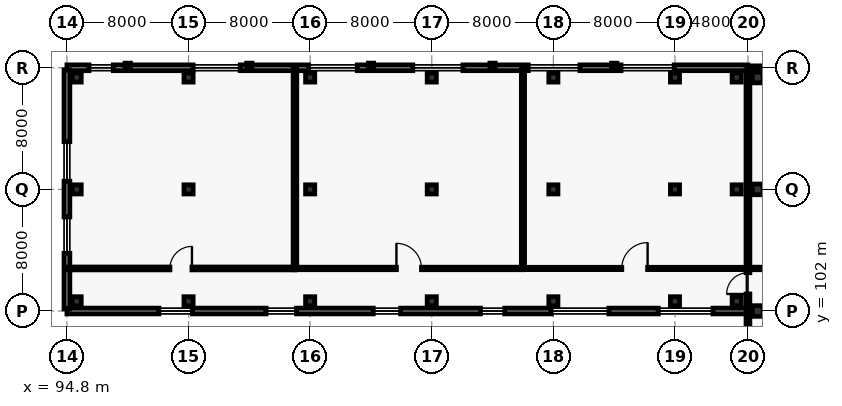
"""IFC4 building model, lengths in metres.
Left out: names, types, materials, properties, quantities, classifications, styles, units other than length and angle.
Written with IfcOpenShell. Run it as: python <this file> out.ifc"""

import sys

from ifc_helpers import new_model, si_unit, direction, frame, frame_2d, origin, origin_2d, place, context, subcontext, project, spatial, rectangle, extrude, element, fill, save


model = new_model("IFC4")
c1 = context("Model", 3, precision=1e-05, world=origin(), true_north=direction((0.0, 1.0)))
c2 = subcontext(c1, "Body", "Model", "MODEL_VIEW")
j1 = project(units=[si_unit("LENGTHUNIT", "METRE"), si_unit("PLANEANGLEUNIT", "RADIAN")], contexts=[c1])
p1 = place(None, origin())
s1 = spatial("IfcSite", under=j1, at=p1, CompositionType="ELEMENT")
p2 = place(p1, origin())
s2 = spatial("IfcBuilding", under=s1, at=p2, CompositionType="ELEMENT")
p3 = place(p2, frame((0.0, 0.0, 10.2)))
s3 = spatial("IfcBuildingStorey", under=s2, at=p3, CompositionType="ELEMENT", Elevation=10.2)
for number, where, z_axis, x_axis in (
    (1, (95.44, 102.64, 0.0), (0.0, 0.0, 1.0), (1.0, 0.0, 0.0)),
    (2, (95.44, 110.0, 0.0), (0.0, 0.0, 1.0), (1.0, 0.0, 0.0)),
    (3, (95.44, 117.36, 0.0), (0.0, 0.0, 1.0), (1.0, 0.0, 0.0)),
    (4, (102.8, 102.64, 0.0), (0.0, 0.0, 1.0), (1.0, 0.0, 0.0)),
    (5, (102.8, 110.0, 0.0), (0.0, 0.0, 1.0), (1.0, 0.0, 0.0)),
    (6, (102.8, 117.36, 0.0), (0.0, 0.0, 1.0), (1.0, 0.0, 0.0)),
    (7, (110.8, 102.64, 0.0), (0.0, 0.0, 1.0), (1.0, 0.0, 0.0)),
    (8, (110.8, 110.0, 0.0), (0.0, 0.0, 1.0), (1.0, 0.0, 0.0)),
    (9, (110.8, 117.36, 0.0), (0.0, 0.0, 1.0), (1.0, 0.0, 0.0)),
    (10, (118.8, 102.64, 0.0), (0.0, 0.0, 1.0), (1.0, 0.0, 0.0)),
    (11, (118.8, 110.0, 0.0), (0.0, 0.0, 1.0), (1.0, 0.0, 0.0)),
    (12, (118.8, 117.36, 0.0), (0.0, 0.0, 1.0), (1.0, 0.0, 0.0)),
    (13, (126.8, 102.64, 0.0), (0.0, 0.0, 1.0), (1.0, 0.0, 0.0)),
    (14, (126.8, 110.0, 0.0), (0.0, 0.0, 1.0), (1.0, 0.0, 0.0)),
    (15, (126.8, 117.36, 0.0), (0.0, 0.0, 1.0), (1.0, 0.0, 0.0)),
    (16, (134.8, 102.64, 0.0), (0.0, 0.0, 1.0), (1.0, 0.0, 0.0)),
    (17, (134.8, 110.0, 0.0), (0.0, 0.0, 1.0), (1.0, 0.0, 0.0)),
    (18, (134.8, 117.36, 0.0), (0.0, 0.0, 1.0), (1.0, 0.0, 0.0)),
    (19, (138.86, 102.64, 0.0), (0.0, 0.0, 1.0), (1.0, 0.0, 0.0)),
    (20, (138.86, 110.0, 0.0), (0.0, 0.0, 1.0), (1.0, 0.0, 0.0)),
    (21, (138.86, 117.36, 0.0), (0.0, 0.0, 1.0), (1.0, 0.0, 0.0)),
):
    element("IfcColumn", number, at=place(p3, frame(where, z_axis=z_axis, x_axis=x_axis)), inside=s3, PredefinedType="COLUMN", context=c2, shape_type="SweptSolid", body=[
        extrude(rectangle(XDim=0.6, YDim=0.6, at=origin_2d()), origin(), (0.0, 0.0, 1.0), 5.4),
    ])
for number, where, z_axis, x_axis in (
    (22, (140.24, 102.0, 0.0), (0.0, 0.0, 1.0), (1.0, 0.0, 0.0)),
    (23, (140.24, 110.0, 0.0), (0.0, 0.0, 1.0), (1.0, 0.0, 0.0)),
    (24, (140.24, 117.36, 0.0), (0.0, 0.0, 1.0), (1.0, 0.0, 0.0)),
):
    element("IfcColumn", number, at=place(p3, frame(where, z_axis=z_axis, x_axis=x_axis)), inside=s3, PredefinedType="COLUMN", context=c2, shape_type="SweptSolid", body=[
        extrude(rectangle(XDim=0.7, YDim=0.7, at=origin_2d()), origin(), (0.0, 0.0, 1.0), 5.4),
    ])
for number, where, z_axis, x_axis in (
    (25, (98.8, 118.08, 0.0), (0.0, 0.0, 1.0), (0.0, 1.0, 0.0)),
    (26, (106.8, 118.08, 0.0), (0.0, 0.0, 1.0), (0.0, 1.0, 0.0)),
    (27, (114.8, 118.08, 0.0), (0.0, 0.0, 1.0), (0.0, 1.0, 0.0)),
    (28, (122.8, 118.08, 0.0), (0.0, 0.0, 1.0), (0.0, 1.0, 0.0)),
    (29, (130.8, 118.08, 0.0), (0.0, 0.0, 1.0), (0.0, 1.0, 0.0)),
):
    element("IfcColumn", number, at=place(p3, frame(where, z_axis=z_axis, x_axis=x_axis)), inside=s3, PredefinedType="PILASTER", context=c2, shape_type="SweptSolid", body=[
        extrude(rectangle(XDim=0.35, YDim=0.45, at=origin_2d()), origin(), (0.0, 0.0, 1.0), 5.4),
    ])
p4 = place(p3, frame((94.8, 118.0, 0.0), z_axis=(0.0, 0.0, 1.0), x_axis=(1.0, 0.0, 0.0)))
e30 = element("IfcWall", 30, at=p4, inside=s3, PredefinedType="SOLIDWALL", context=c2, shape_type="SweptSolid", body=[
    extrude(rectangle(XDim=44.795, YDim=0.38, at=frame_2d((22.397, 0.0))), origin(), (0.0, 0.0, 1.0), 5.16),
])
p5 = place(p4, frame((1.45, 0.0, 0.9)))
e31 = element("IfcOpeningElement", 31, at=p5, cuts=e30, PredefinedType="OPENING", context=c2, shape_type="SweptSolid", body=[
    extrude(rectangle(XDim=1.6, YDim=1.65, at=frame_2d((0.8, 0.825))), frame((0.0, 0.2, 0.0), z_axis=(0.0, -1.0, 0.0), x_axis=(1.0, 0.0, 0.0)), (0.0, 0.0, 1.0), 0.4),
])
p6 = place(p4, frame((8.3, 0.0, 0.9)))
e32 = element("IfcOpeningElement", 32, at=p6, cuts=e30, PredefinedType="OPENING", context=c2, shape_type="SweptSolid", body=[
    extrude(rectangle(XDim=3.1, YDim=2.45, at=frame_2d((1.55, 1.225))), frame((0.0, 0.2, 0.0), z_axis=(0.0, -1.0, 0.0), x_axis=(1.0, 0.0, 0.0)), (0.0, 0.0, 1.0), 0.4),
])
p7 = place(p4, frame((15.9, 0.0, 0.9)))
e33 = element("IfcOpeningElement", 33, at=p7, cuts=e30, PredefinedType="OPENING", context=c2, shape_type="SweptSolid", body=[
    extrude(rectangle(XDim=3.2, YDim=2.5, at=frame_2d((1.6, 1.25))), frame((0.0, 0.2, 0.0), z_axis=(0.0, -1.0, 0.0), x_axis=(1.0, 0.0, 0.0)), (0.0, 0.0, 1.0), 0.4),
])
p8 = place(p4, frame((22.75, 0.0, 0.9)))
e34 = element("IfcOpeningElement", 34, at=p8, cuts=e30, PredefinedType="OPENING", context=c2, shape_type="SweptSolid", body=[
    extrude(rectangle(XDim=3.3, YDim=2.5, at=frame_2d((1.65, 1.25))), frame((0.0, 0.2, 0.0), z_axis=(0.0, -1.0, 0.0), x_axis=(1.0, 0.0, 0.0)), (0.0, 0.0, 1.0), 0.4),
])
p9 = place(p4, frame((30.35, 0.0, 0.9)))
e35 = element("IfcOpeningElement", 35, at=p9, cuts=e30, PredefinedType="OPENING", context=c2, shape_type="SweptSolid", body=[
    extrude(rectangle(XDim=3.4, YDim=2.55, at=frame_2d((1.7, 1.275))), frame((0.0, 0.2, 0.0), z_axis=(0.0, -1.0, 0.0), x_axis=(1.0, 0.0, 0.0)), (0.0, 0.0, 1.0), 0.4),
])
p10 = place(p4, frame((36.45, 0.0, 0.9)))
e36 = element("IfcOpeningElement", 36, at=p10, cuts=e30, PredefinedType="OPENING", context=c2, shape_type="SweptSolid", body=[
    extrude(rectangle(XDim=3.5, YDim=2.55, at=frame_2d((1.75, 1.275))), frame((0.0, 0.2, 0.0), z_axis=(0.0, -1.0, 0.0), x_axis=(1.0, 0.0, 0.0)), (0.0, 0.0, 1.0), 0.4),
])
p11 = place(p3, frame((139.5, 102.0, 0.0), z_axis=(0.0, 0.0, 1.0), x_axis=(-1.0, 0.0, 0.0)))
e37 = element("IfcWall", 37, at=p11, inside=s3, PredefinedType="SOLIDWALL", context=c2, shape_type="SweptSolid", body=[
    extrude(rectangle(XDim=44.7, YDim=0.38, at=frame_2d((22.35, 0.0))), origin(), (0.0, 0.0, 1.0), 5.16),
])
p12 = place(p11, frame((2.2, 0.0, 0.9)))
e38 = element("IfcOpeningElement", 38, at=p12, cuts=e37, PredefinedType="OPENING", context=c2, shape_type="SweptSolid", body=[
    extrude(rectangle(XDim=3.6, YDim=2.6, at=frame_2d((1.8, 1.3))), frame((0.0, 0.2, 0.0), z_axis=(0.0, -1.0, 0.0), x_axis=(1.0, 0.0, 0.0)), (0.0, 0.0, 1.0), 0.4),
])
p13 = place(p11, frame((9.05, 0.0, 0.9)))
e39 = element("IfcOpeningElement", 39, at=p13, cuts=e37, PredefinedType="OPENING", context=c2, shape_type="SweptSolid", body=[
    extrude(rectangle(XDim=3.8, YDim=2.6, at=frame_2d((1.9, 1.3))), frame((0.0, 0.2, 0.0), z_axis=(0.0, -1.0, 0.0), x_axis=(1.0, 0.0, 0.0)), (0.0, 0.0, 1.0), 0.4),
])
p14 = place(p11, frame((15.9, 0.0, 0.9)))
e40 = element("IfcOpeningElement", 40, at=p14, cuts=e37, PredefinedType="OPENING", context=c2, shape_type="SweptSolid", body=[
    extrude(rectangle(XDim=1.6, YDim=1.65, at=frame_2d((0.8, 0.825))), frame((0.0, 0.2, 0.0), z_axis=(0.0, -1.0, 0.0), x_axis=(1.0, 0.0, 0.0)), (0.0, 0.0, 1.0), 0.4),
])
p15 = place(p11, frame((22.75, 0.0, 0.9)))
e41 = element("IfcOpeningElement", 41, at=p15, cuts=e37, PredefinedType="OPENING", context=c2, shape_type="SweptSolid", body=[
    extrude(rectangle(XDim=1.8, YDim=1.65, at=frame_2d((0.9, 0.825))), frame((0.0, 0.2, 0.0), z_axis=(0.0, -1.0, 0.0), x_axis=(1.0, 0.0, 0.0)), (0.0, 0.0, 1.0), 0.4),
])
p16 = place(p11, frame((29.6, 0.0, 0.9)))
e42 = element("IfcOpeningElement", 42, at=p16, cuts=e37, PredefinedType="OPENING", context=c2, shape_type="SweptSolid", body=[
    extrude(rectangle(XDim=2.0, YDim=1.7, at=frame_2d((1.0, 0.85))), frame((0.0, 0.2, 0.0), z_axis=(0.0, -1.0, 0.0), x_axis=(1.0, 0.0, 0.0)), (0.0, 0.0, 1.0), 0.4),
])
p17 = place(p11, frame((36.45, 0.0, 0.9)))
e43 = element("IfcOpeningElement", 43, at=p17, cuts=e37, PredefinedType="OPENING", context=c2, shape_type="SweptSolid", body=[
    extrude(rectangle(XDim=2.2, YDim=1.7, at=frame_2d((1.1, 0.85))), frame((0.0, 0.2, 0.0), z_axis=(0.0, -1.0, 0.0), x_axis=(1.0, 0.0, 0.0)), (0.0, 0.0, 1.0), 0.4),
])
p18 = place(p3, frame((94.8, 102.14, 0.0), z_axis=(0.0, 0.0, 1.0), x_axis=(0.0, 1.0, 0.0)))
e44 = element("IfcWall", 44, at=p18, inside=s3, PredefinedType="SOLIDWALL", context=c2, shape_type="SweptSolid", body=[
    extrude(rectangle(XDim=15.72, YDim=0.38, at=frame_2d((7.86, 0.0))), origin(), (0.0, 0.0, 1.0), 5.16),
])
p19 = place(p18, frame((3.65, 0.0, 0.9)))
e45 = element("IfcOpeningElement", 45, at=p19, cuts=e44, PredefinedType="OPENING", context=c2, shape_type="SweptSolid", body=[
    extrude(rectangle(XDim=2.4, YDim=1.75, at=frame_2d((1.2, 0.875))), frame((0.0, 0.2, 0.0), z_axis=(0.0, -1.0, 0.0), x_axis=(1.0, 0.0, 0.0)), (0.0, 0.0, 1.0), 0.4),
])
p20 = place(p18, frame((8.4, 0.0, 0.9)))
e46 = element("IfcOpeningElement", 46, at=p20, cuts=e44, PredefinedType="OPENING", context=c2, shape_type="SweptSolid", body=[
    extrude(rectangle(XDim=2.6, YDim=1.75, at=frame_2d((1.3, 0.875))), frame((0.0, 0.2, 0.0), z_axis=(0.0, -1.0, 0.0), x_axis=(1.0, 0.0, 0.0)), (0.0, 0.0, 1.0), 0.4),
])
p21 = place(p3, frame((139.6, 118.0, 0.0), z_axis=(0.0, 0.0, 1.0), x_axis=(1.0, 0.0, 0.0)))
e47 = element("IfcWall", 47, at=p21, inside=s3, PredefinedType="SOLIDWALL", context=c2, shape_type="SweptSolid", body=[
    extrude(rectangle(XDim=32.4, YDim=0.25, at=frame_2d((16.2, 0.0))), origin(), (0.0, 0.0, 1.0), 5.16),
])
p22 = place(p21, frame((2.2, 0.0, 0.9)))
e48 = element("IfcOpeningElement", 48, at=p22, cuts=e47, PredefinedType="OPENING", context=c2, shape_type="SweptSolid", body=[
    extrude(rectangle(XDim=3.4, YDim=2.55, at=frame_2d((1.7, 1.275))), frame((0.0, 0.135, 0.0), z_axis=(0.0, -1.0, 0.0), x_axis=(1.0, 0.0, 0.0)), (0.0, 0.0, 1.0), 0.27),
])
p23 = place(p21, frame((7.96, 0.0, 0.9)))
e49 = element("IfcOpeningElement", 49, at=p23, cuts=e47, PredefinedType="OPENING", context=c2, shape_type="SweptSolid", body=[
    extrude(rectangle(XDim=3.5, YDim=2.55, at=frame_2d((1.75, 1.275))), frame((0.0, 0.135, 0.0), z_axis=(0.0, -1.0, 0.0), x_axis=(1.0, 0.0, 0.0)), (0.0, 0.0, 1.0), 0.27),
])
p24 = place(p21, frame((12.27, 0.0, 0.9)))
e50 = element("IfcOpeningElement", 50, at=p24, cuts=e47, PredefinedType="OPENING", context=c2, shape_type="SweptSolid", body=[
    extrude(rectangle(XDim=3.6, YDim=2.6, at=frame_2d((1.8, 1.3))), frame((0.0, 0.135, 0.0), z_axis=(0.0, -1.0, 0.0), x_axis=(1.0, 0.0, 0.0)), (0.0, 0.0, 1.0), 0.27),
])
p25 = place(p21, frame((19.48, 0.0, 0.9)))
e51 = element("IfcOpeningElement", 51, at=p25, cuts=e47, PredefinedType="OPENING", context=c2, shape_type="SweptSolid", body=[
    extrude(rectangle(XDim=1.6, YDim=1.65, at=frame_2d((0.8, 0.825))), frame((0.0, 0.135, 0.0), z_axis=(0.0, -1.0, 0.0), x_axis=(1.0, 0.0, 0.0)), (0.0, 0.0, 1.0), 0.27),
])
p26 = place(p3, frame((139.6, 71.74, 0.0), z_axis=(0.0, 0.0, 1.0), x_axis=(0.0, 1.0, 0.0)))
e52 = element("IfcWall", 52, at=p26, inside=s3, PredefinedType="SOLIDWALL", context=c2, shape_type="SweptSolid", body=[
    extrude(rectangle(XDim=46.12, YDim=0.25, at=frame_2d((23.06, 0.0))), origin(), (0.0, 0.0, 1.0), 4.31),
])
p27 = place(p26, frame((31.38, 0.0, 0.0)))
e53 = element("IfcOpeningElement", 53, at=p27, cuts=e52, PredefinedType="OPENING", context=c2, shape_type="SweptSolid", body=[
    extrude(rectangle(XDim=1.4, YDim=2.25, at=frame_2d((0.7, 1.125))), frame((0.0, 0.135, 0.0), z_axis=(0.0, -1.0, 0.0), x_axis=(1.0, 0.0, 0.0)), (0.0, 0.0, 1.0), 0.27),
])
p28 = place(p3, frame((94.8, 104.8, 0.0), z_axis=(0.0, 0.0, 1.0), x_axis=(1.0, 0.0, 0.0)))
e54 = element("IfcWall", 54, at=p28, inside=s3, PredefinedType="PARTITIONING", context=c2, shape_type="SweptSolid", body=[
    extrude(rectangle(XDim=15.0, YDim=0.19, at=frame_2d((7.5, 0.0))), origin(), (0.0, 0.0, 1.0), 5.16),
])
p29 = place(p28, frame((6.775, 0.0, 0.0)))
e55 = element("IfcOpeningElement", 55, at=p29, cuts=e54, PredefinedType="OPENING", context=c2, shape_type="SweptSolid", body=[
    extrude(rectangle(XDim=1.45, YDim=2.25, at=frame_2d((0.725, 1.125))), frame((0.0, 0.105, 0.0), z_axis=(0.0, -1.0, 0.0), x_axis=(1.0, 0.0, 0.0)), (0.0, 0.0, 1.0), 0.21),
])
p30 = place(p3, frame((109.8, 104.8, 0.0), z_axis=(0.0, 0.0, 1.0), x_axis=(1.0, 0.0, 0.0)))
e56 = element("IfcWall", 56, at=p30, inside=s3, PredefinedType="PARTITIONING", context=c2, shape_type="SweptSolid", body=[
    extrude(rectangle(XDim=15.0, YDim=0.165, at=frame_2d((7.5, 0.0))), origin(), (0.0, 0.0, 1.0), 5.16),
])
p31 = place(p30, frame((6.675, 0.0, 0.0)))
e57 = element("IfcOpeningElement", 57, at=p31, cuts=e56, PredefinedType="OPENING", context=c2, shape_type="SweptSolid", body=[
    extrude(rectangle(XDim=1.65, YDim=2.3, at=frame_2d((0.825, 1.15))), frame((0.0, 0.093, 0.0), z_axis=(0.0, -1.0, 0.0), x_axis=(1.0, 0.0, 0.0)), (0.0, 0.0, 1.0), 0.185),
])
p32 = place(p3, frame((124.8, 104.8, 0.0), z_axis=(0.0, 0.0, 1.0), x_axis=(1.0, 0.0, 0.0)))
e58 = element("IfcWall", 58, at=p32, inside=s3, PredefinedType="PARTITIONING", context=c2, shape_type="SweptSolid", body=[
    extrude(rectangle(XDim=14.7, YDim=0.15, at=frame_2d((7.35, 0.0))), origin(), (0.0, 0.0, 1.0), 5.16),
])
p33 = place(p32, frame((6.5, 0.0, 0.0)))
e59 = element("IfcOpeningElement", 59, at=p33, cuts=e58, PredefinedType="OPENING", context=c2, shape_type="SweptSolid", body=[
    extrude(rectangle(XDim=1.7, YDim=2.3, at=frame_2d((0.85, 1.15))), frame((0.0, 0.085, 0.0), z_axis=(0.0, -1.0, 0.0), x_axis=(1.0, 0.0, 0.0)), (0.0, 0.0, 1.0), 0.17),
])
p34 = place(p3, frame((109.8, 118.0, 0.0), z_axis=(0.0, 0.0, 1.0), x_axis=(0.0, -1.0, 0.0)))
e60 = element("IfcWall", 60, at=p34, inside=s3, PredefinedType="PARTITIONING", context=c2, shape_type="SweptSolid", body=[
    extrude(rectangle(XDim=13.2, YDim=0.24, at=frame_2d((6.6, 0.0))), origin(), (0.0, 0.0, 1.0), 5.16),
])
p35 = place(p3, frame((124.8, 118.0, 0.0), z_axis=(0.0, 0.0, 1.0), x_axis=(0.0, -1.0, 0.0)))
e61 = element("IfcWall", 61, at=p35, inside=s3, PredefinedType="PARTITIONING", context=c2, shape_type="SweptSolid", body=[
    extrude(rectangle(XDim=13.2, YDim=0.21, at=frame_2d((6.6, 0.0))), origin(), (0.0, 0.0, 1.0), 5.16),
])
p36 = place(p3, frame((157.4, 102.0, 0.0), z_axis=(0.0, 0.0, 1.0), x_axis=(-1.0, 0.0, 0.0)))
e62 = element("IfcWall", 62, at=p36, inside=s3, PredefinedType="PARTITIONING", context=c2, shape_type="SweptSolid", body=[
    extrude(rectangle(XDim=17.8, YDim=0.19, at=frame_2d((8.9, 0.0))), origin(), (0.0, 0.0, 1.0), 4.51),
])
p37 = place(p36, frame((8.38, 0.0, 0.0)))
e63 = element("IfcOpeningElement", 63, at=p37, cuts=e62, PredefinedType="OPENING", context=c2, shape_type="SweptSolid", body=[
    extrude(rectangle(XDim=1.04, YDim=2.2, at=frame_2d((0.52, 1.1))), frame((0.0, 0.105, 0.0), z_axis=(0.0, -1.0, 0.0), x_axis=(1.0, 0.0, 0.0)), (0.0, 0.0, 1.0), 0.21),
])
p38 = place(p3, frame((139.6, 104.8, 0.0), z_axis=(0.0, 0.0, 1.0), x_axis=(1.0, 0.0, 0.0)))
e64 = element("IfcWall", 64, at=p38, inside=s3, PredefinedType="PARTITIONING", context=c2, shape_type="SweptSolid", body=[
    extrude(rectangle(XDim=17.8, YDim=0.165, at=frame_2d((8.9, 0.0))), origin(), (0.0, 0.0, 1.0), 5.16),
])
p39 = place(p38, frame((8.41, 0.0, 0.0)))
e65 = element("IfcOpeningElement", 65, at=p39, cuts=e64, PredefinedType="OPENING", context=c2, shape_type="SweptSolid", body=[
    extrude(rectangle(XDim=0.98, YDim=2.1, at=frame_2d((0.49, 1.05))), frame((0.0, 0.093, 0.0), z_axis=(0.0, -1.0, 0.0), x_axis=(1.0, 0.0, 0.0)), (0.0, 0.0, 1.0), 0.185),
])
p40 = place(p38, frame((13.394, 0.0, 0.0)))
e66 = element("IfcOpeningElement", 66, at=p40, cuts=e64, PredefinedType="OPENING", context=c2, shape_type="SweptSolid", body=[
    extrude(rectangle(XDim=0.98, YDim=2.1, at=frame_2d((0.49, 1.05))), frame((0.0, 0.093, 0.0), z_axis=(0.0, -1.0, 0.0), x_axis=(1.0, 0.0, 0.0)), (0.0, 0.0, 1.0), 0.185),
])
p41 = place(p5, origin())
e67 = element("IfcWindow", 67, at=p41, inside=s3, PartitioningType="SINGLE_PANEL", PredefinedType="WINDOW", context=c2, shape_type="SweptSolid", body=[
    extrude(rectangle(XDim=1.6, YDim=1.65, at=frame_2d((0.8, 0.825))), frame((0.0, 0.03, 0.0), z_axis=(0.0, -1.0, 0.0), x_axis=(1.0, 0.0, 0.0)), (0.0, 0.0, 1.0), 0.06),
])
fill(e31, e67)
p42 = place(p6, origin())
e68 = element("IfcWindow", 68, at=p42, inside=s3, PartitioningType="SINGLE_PANEL", PredefinedType="WINDOW", context=c2, shape_type="SweptSolid", body=[
    extrude(rectangle(XDim=3.1, YDim=2.45, at=frame_2d((1.55, 1.225))), frame((0.0, 0.03, 0.0), z_axis=(0.0, -1.0, 0.0), x_axis=(1.0, 0.0, 0.0)), (0.0, 0.0, 1.0), 0.06),
])
fill(e32, e68)
p43 = place(p7, origin())
e69 = element("IfcWindow", 69, at=p43, inside=s3, PartitioningType="SINGLE_PANEL", PredefinedType="WINDOW", context=c2, shape_type="SweptSolid", body=[
    extrude(rectangle(XDim=3.2, YDim=2.5, at=frame_2d((1.6, 1.25))), frame((0.0, 0.03, 0.0), z_axis=(0.0, -1.0, 0.0), x_axis=(1.0, 0.0, 0.0)), (0.0, 0.0, 1.0), 0.06),
])
fill(e33, e69)
p44 = place(p8, origin())
e70 = element("IfcWindow", 70, at=p44, inside=s3, PartitioningType="SINGLE_PANEL", PredefinedType="WINDOW", context=c2, shape_type="SweptSolid", body=[
    extrude(rectangle(XDim=3.3, YDim=2.5, at=frame_2d((1.65, 1.25))), frame((0.0, 0.03, 0.0), z_axis=(0.0, -1.0, 0.0), x_axis=(1.0, 0.0, 0.0)), (0.0, 0.0, 1.0), 0.06),
])
fill(e34, e70)
p45 = place(p9, origin())
e71 = element("IfcWindow", 71, at=p45, inside=s3, PartitioningType="SINGLE_PANEL", PredefinedType="WINDOW", context=c2, shape_type="SweptSolid", body=[
    extrude(rectangle(XDim=3.4, YDim=2.55, at=frame_2d((1.7, 1.275))), frame((0.0, 0.03, 0.0), z_axis=(0.0, -1.0, 0.0), x_axis=(1.0, 0.0, 0.0)), (0.0, 0.0, 1.0), 0.06),
])
fill(e35, e71)
p46 = place(p10, origin())
e72 = element("IfcWindow", 72, at=p46, inside=s3, PartitioningType="SINGLE_PANEL", PredefinedType="WINDOW", context=c2, shape_type="SweptSolid", body=[
    extrude(rectangle(XDim=3.5, YDim=2.55, at=frame_2d((1.75, 1.275))), frame((0.0, 0.03, 0.0), z_axis=(0.0, -1.0, 0.0), x_axis=(1.0, 0.0, 0.0)), (0.0, 0.0, 1.0), 0.06),
])
fill(e36, e72)
p47 = place(p12, origin())
e73 = element("IfcWindow", 73, at=p47, inside=s3, PartitioningType="SINGLE_PANEL", PredefinedType="WINDOW", context=c2, shape_type="SweptSolid", body=[
    extrude(rectangle(XDim=3.6, YDim=2.6, at=frame_2d((1.8, 1.3))), frame((0.0, 0.03, 0.0), z_axis=(0.0, -1.0, 0.0), x_axis=(1.0, 0.0, 0.0)), (0.0, 0.0, 1.0), 0.06),
])
fill(e38, e73)
p48 = place(p13, origin())
e74 = element("IfcWindow", 74, at=p48, inside=s3, PartitioningType="SINGLE_PANEL", PredefinedType="WINDOW", context=c2, shape_type="SweptSolid", body=[
    extrude(rectangle(XDim=3.8, YDim=2.6, at=frame_2d((1.9, 1.3))), frame((0.0, 0.03, 0.0), z_axis=(0.0, -1.0, 0.0), x_axis=(1.0, 0.0, 0.0)), (0.0, 0.0, 1.0), 0.06),
])
fill(e39, e74)
p49 = place(p14, origin())
e75 = element("IfcWindow", 75, at=p49, inside=s3, PartitioningType="SINGLE_PANEL", PredefinedType="WINDOW", context=c2, shape_type="SweptSolid", body=[
    extrude(rectangle(XDim=1.6, YDim=1.65, at=frame_2d((0.8, 0.825))), frame((0.0, 0.03, 0.0), z_axis=(0.0, -1.0, 0.0), x_axis=(1.0, 0.0, 0.0)), (0.0, 0.0, 1.0), 0.06),
])
fill(e40, e75)
p50 = place(p15, origin())
e76 = element("IfcWindow", 76, at=p50, inside=s3, PartitioningType="SINGLE_PANEL", PredefinedType="WINDOW", context=c2, shape_type="SweptSolid", body=[
    extrude(rectangle(XDim=1.8, YDim=1.65, at=frame_2d((0.9, 0.825))), frame((0.0, 0.03, 0.0), z_axis=(0.0, -1.0, 0.0), x_axis=(1.0, 0.0, 0.0)), (0.0, 0.0, 1.0), 0.06),
])
fill(e41, e76)
p51 = place(p16, origin())
e77 = element("IfcWindow", 77, at=p51, inside=s3, PartitioningType="SINGLE_PANEL", PredefinedType="WINDOW", context=c2, shape_type="SweptSolid", body=[
    extrude(rectangle(XDim=2.0, YDim=1.7, at=frame_2d((1.0, 0.85))), frame((0.0, 0.03, 0.0), z_axis=(0.0, -1.0, 0.0), x_axis=(1.0, 0.0, 0.0)), (0.0, 0.0, 1.0), 0.06),
])
fill(e42, e77)
p52 = place(p17, origin())
e78 = element("IfcWindow", 78, at=p52, inside=s3, PartitioningType="SINGLE_PANEL", PredefinedType="WINDOW", context=c2, shape_type="SweptSolid", body=[
    extrude(rectangle(XDim=2.2, YDim=1.7, at=frame_2d((1.1, 0.85))), frame((0.0, 0.03, 0.0), z_axis=(0.0, -1.0, 0.0), x_axis=(1.0, 0.0, 0.0)), (0.0, 0.0, 1.0), 0.06),
])
fill(e43, e78)
p53 = place(p19, origin())
e79 = element("IfcWindow", 79, at=p53, inside=s3, PartitioningType="SINGLE_PANEL", PredefinedType="WINDOW", context=c2, shape_type="SweptSolid", body=[
    extrude(rectangle(XDim=2.4, YDim=1.75, at=frame_2d((1.2, 0.875))), frame((0.0, 0.03, 0.0), z_axis=(0.0, -1.0, 0.0), x_axis=(1.0, 0.0, 0.0)), (0.0, 0.0, 1.0), 0.06),
])
fill(e45, e79)
p54 = place(p20, origin())
e80 = element("IfcWindow", 80, at=p54, inside=s3, PartitioningType="SINGLE_PANEL", PredefinedType="WINDOW", context=c2, shape_type="SweptSolid", body=[
    extrude(rectangle(XDim=2.6, YDim=1.75, at=frame_2d((1.3, 0.875))), frame((0.0, 0.03, 0.0), z_axis=(0.0, -1.0, 0.0), x_axis=(1.0, 0.0, 0.0)), (0.0, 0.0, 1.0), 0.06),
])
fill(e46, e80)
p55 = place(p27, origin())
e81 = element("IfcDoor", 81, at=p55, inside=s3, OperationType="SINGLE_SWING_LEFT", PredefinedType="DOOR", context=c2, shape_type="SweptSolid", body=[
    extrude(rectangle(XDim=1.4, YDim=2.25, at=frame_2d((0.7, 1.125))), frame((0.0, 0.025, 0.0), z_axis=(0.0, -1.0, 0.0), x_axis=(1.0, 0.0, 0.0)), (0.0, 0.0, 1.0), 0.05),
])
fill(e53, e81)
p56 = place(p29, origin())
e82 = element("IfcDoor", 82, at=p56, inside=s3, OperationType="SINGLE_SWING_RIGHT", PredefinedType="DOOR", context=c2, shape_type="SweptSolid", body=[
    extrude(rectangle(XDim=1.45, YDim=2.25, at=frame_2d((0.725, 1.125))), frame((0.0, 0.025, 0.0), z_axis=(0.0, -1.0, 0.0), x_axis=(1.0, 0.0, 0.0)), (0.0, 0.0, 1.0), 0.05),
])
fill(e55, e82)
p57 = place(p31, origin())
e83 = element("IfcDoor", 83, at=p57, inside=s3, OperationType="SINGLE_SWING_LEFT", PredefinedType="DOOR", context=c2, shape_type="SweptSolid", body=[
    extrude(rectangle(XDim=1.65, YDim=2.3, at=frame_2d((0.825, 1.15))), frame((0.0, 0.025, 0.0), z_axis=(0.0, -1.0, 0.0), x_axis=(1.0, 0.0, 0.0)), (0.0, 0.0, 1.0), 0.05),
])
fill(e57, e83)
p58 = place(p33, origin())
e84 = element("IfcDoor", 84, at=p58, inside=s3, OperationType="SINGLE_SWING_RIGHT", PredefinedType="DOOR", context=c2, shape_type="SweptSolid", body=[
    extrude(rectangle(XDim=1.7, YDim=2.3, at=frame_2d((0.85, 1.15))), frame((0.0, 0.025, 0.0), z_axis=(0.0, -1.0, 0.0), x_axis=(1.0, 0.0, 0.0)), (0.0, 0.0, 1.0), 0.05),
])
fill(e59, e84)
save(model, sys.argv[1])
